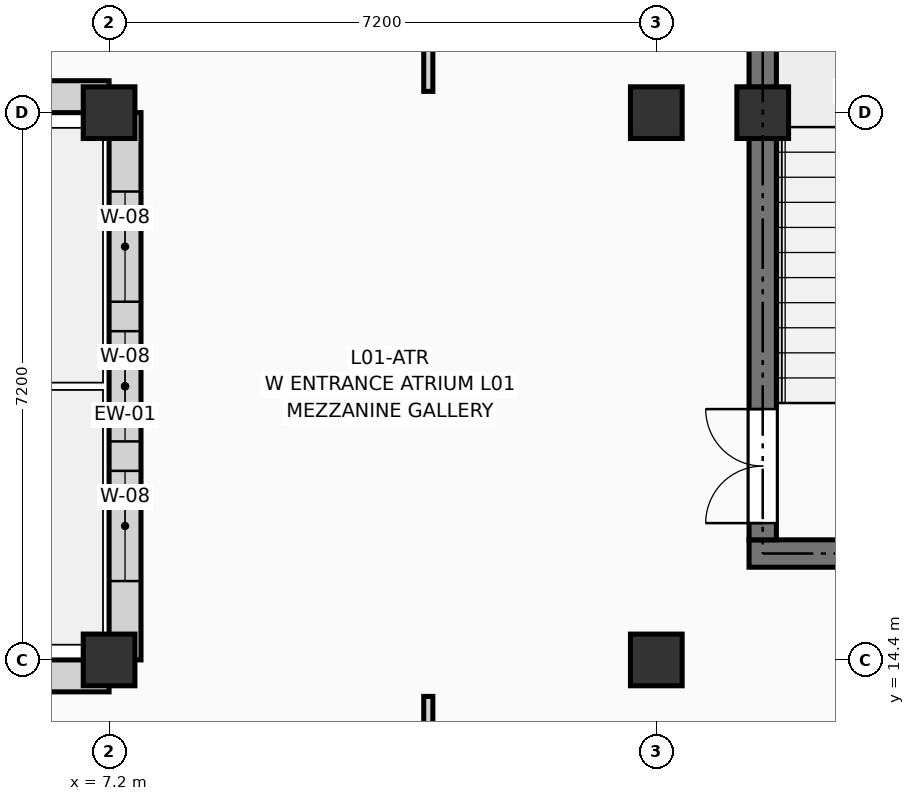
"""IFC4 building model, lengths in metres.
Left out: names, types, materials, properties, quantities, classifications, styles, units other than length and angle.
Written with IfcOpenShell. Run it as: python <this file> out.ifc"""

import sys

from ifc_helpers import new_model, si_unit, direction, frame, frame_2d, origin, origin_2d, place, context, subcontext, project, spatial, rectangle, extrude, element, fill, save


model = new_model("IFC4")
c1 = context("Model", 3, precision=1e-05, world=origin(), true_north=direction((0.0, 1.0)))
c2 = subcontext(c1, "Body", "Model", "MODEL_VIEW")
j1 = project(units=[si_unit("LENGTHUNIT", "METRE"), si_unit("PLANEANGLEUNIT", "RADIAN")], contexts=[c1])
p1 = place(None, origin())
s1 = spatial("IfcSite", under=j1, at=p1, CompositionType="ELEMENT")
p2 = place(p1, origin())
s2 = spatial("IfcBuilding", under=s1, at=p2, CompositionType="ELEMENT")
p3 = place(p2, frame((0.0, 0.0, 4.5)))
s3 = spatial("IfcBuildingStorey", under=s2, at=p3, CompositionType="ELEMENT", Elevation=4.5)
for number, where, z_axis, x_axis in (
    (1, (7.2, 14.4, 0.0), (0.0, 0.0, 1.0), (1.0, 0.0, 0.0)),
    (2, (7.2, 21.6, 0.0), (0.0, 0.0, 1.0), (1.0, 0.0, 0.0)),
    (3, (14.4, 14.4, 0.0), (0.0, 0.0, 1.0), (1.0, 0.0, 0.0)),
    (4, (14.4, 21.6, 0.0), (0.0, 0.0, 1.0), (1.0, 0.0, 0.0)),
    (5, (15.8, 21.6, 0.0), (0.0, 0.0, 1.0), (1.0, 0.0, 0.0)),
):
    element("IfcColumn", number, at=place(p3, frame(where, z_axis=z_axis, x_axis=x_axis)), inside=s3, PredefinedType="COLUMN", context=c2, shape_type="SweptSolid", body=[
        extrude(rectangle(XDim=0.68, YDim=0.68, at=origin_2d()), origin(), (0.0, 0.0, 1.0), 4.05),
    ])
p4 = place(p3, frame((7.41, 14.4, 0.0), z_axis=(0.0, 0.0, 1.0), x_axis=(0.0, 1.0, 0.0)))
e6 = element("IfcWall", 6, at=p4, inside=s3, PredefinedType="SOLIDWALL", context=c2, shape_type="SweptSolid", body=[
    extrude(rectangle(XDim=7.2, YDim=0.42, at=frame_2d((3.6, 0.0))), origin(), (0.0, 0.0, 1.0), 3.16),
])
p5 = place(p4, frame((1.038, 0.0, 0.18)))
e7 = element("IfcOpeningElement", 7, at=p5, cuts=e6, PredefinedType="OPENING", context=c2, shape_type="SweptSolid", body=[
    extrude(rectangle(XDim=1.45, YDim=2.8, at=frame_2d((0.725, 1.4))), frame((0.0, 0.222, 0.0), z_axis=(0.0, -1.0, 0.0), x_axis=(1.0, 0.0, 0.0)), (0.0, 0.0, 1.0), 0.444),
])
p6 = place(p4, frame((2.875, 0.0, 0.18)))
e8 = element("IfcOpeningElement", 8, at=p6, cuts=e6, PredefinedType="OPENING", context=c2, shape_type="SweptSolid", body=[
    extrude(rectangle(XDim=1.45, YDim=2.8, at=frame_2d((0.725, 1.4))), frame((0.0, 0.222, 0.0), z_axis=(0.0, -1.0, 0.0), x_axis=(1.0, 0.0, 0.0)), (0.0, 0.0, 1.0), 0.444),
])
p7 = place(p4, frame((4.712, 0.0, 0.18)))
e9 = element("IfcOpeningElement", 9, at=p7, cuts=e6, PredefinedType="OPENING", context=c2, shape_type="SweptSolid", body=[
    extrude(rectangle(XDim=1.45, YDim=2.8, at=frame_2d((0.725, 1.4))), frame((0.0, 0.222, 0.0), z_axis=(0.0, -1.0, 0.0), x_axis=(1.0, 0.0, 0.0)), (0.0, 0.0, 1.0), 0.444),
])
p8 = place(p3, frame((0.0, 21.81, 0.0), z_axis=(0.0, 0.0, 1.0), x_axis=(1.0, 0.0, 0.0)))
e10 = element("IfcWall", 10, at=p8, inside=s3, PredefinedType="SOLIDWALL", context=c2, shape_type="SweptSolid", body=[
    extrude(rectangle(XDim=7.2, YDim=0.42, at=frame_2d((3.6, 0.0))), origin(), (0.0, 0.0, 1.0), 3.16),
])
p9 = place(p8, frame((1.038, 0.0, 0.18)))
e11 = element("IfcOpeningElement", 11, at=p9, cuts=e10, PredefinedType="OPENING", context=c2, shape_type="SweptSolid", body=[
    extrude(rectangle(XDim=1.45, YDim=2.8, at=frame_2d((0.725, 1.4))), frame((0.0, 0.222, 0.0), z_axis=(0.0, -1.0, 0.0), x_axis=(1.0, 0.0, 0.0)), (0.0, 0.0, 1.0), 0.444),
])
p10 = place(p8, frame((2.875, 0.0, 0.18)))
e12 = element("IfcOpeningElement", 12, at=p10, cuts=e10, PredefinedType="OPENING", context=c2, shape_type="SweptSolid", body=[
    extrude(rectangle(XDim=1.45, YDim=2.8, at=frame_2d((0.725, 1.4))), frame((0.0, 0.222, 0.0), z_axis=(0.0, -1.0, 0.0), x_axis=(1.0, 0.0, 0.0)), (0.0, 0.0, 1.0), 0.444),
])
p11 = place(p8, frame((4.712, 0.0, 0.18)))
e13 = element("IfcOpeningElement", 13, at=p11, cuts=e10, PredefinedType="OPENING", context=c2, shape_type="SweptSolid", body=[
    extrude(rectangle(XDim=1.45, YDim=2.8, at=frame_2d((0.725, 1.4))), frame((0.0, 0.222, 0.0), z_axis=(0.0, -1.0, 0.0), x_axis=(1.0, 0.0, 0.0)), (0.0, 0.0, 1.0), 0.444),
])
p12 = place(p3, frame((0.0, 14.19, 0.0), z_axis=(0.0, 0.0, 1.0), x_axis=(1.0, 0.0, 0.0)))
e14 = element("IfcWall", 14, at=p12, inside=s3, PredefinedType="SOLIDWALL", context=c2, shape_type="SweptSolid", body=[
    extrude(rectangle(XDim=7.2, YDim=0.42, at=frame_2d((3.6, 0.0))), origin(), (0.0, 0.0, 1.0), 3.16),
])
p13 = place(p12, frame((1.038, 0.0, 0.18)))
e15 = element("IfcOpeningElement", 15, at=p13, cuts=e14, PredefinedType="OPENING", context=c2, shape_type="SweptSolid", body=[
    extrude(rectangle(XDim=1.45, YDim=2.8, at=frame_2d((0.725, 1.4))), frame((0.0, 0.222, 0.0), z_axis=(0.0, -1.0, 0.0), x_axis=(1.0, 0.0, 0.0)), (0.0, 0.0, 1.0), 0.444),
])
p14 = place(p12, frame((2.875, 0.0, 0.18)))
e16 = element("IfcOpeningElement", 16, at=p14, cuts=e14, PredefinedType="OPENING", context=c2, shape_type="SweptSolid", body=[
    extrude(rectangle(XDim=1.45, YDim=2.8, at=frame_2d((0.725, 1.4))), frame((0.0, 0.222, 0.0), z_axis=(0.0, -1.0, 0.0), x_axis=(1.0, 0.0, 0.0)), (0.0, 0.0, 1.0), 0.444),
])
p15 = place(p12, frame((4.712, 0.0, 0.18)))
e17 = element("IfcOpeningElement", 17, at=p15, cuts=e14, PredefinedType="OPENING", context=c2, shape_type="SweptSolid", body=[
    extrude(rectangle(XDim=1.45, YDim=2.8, at=frame_2d((0.725, 1.4))), frame((0.0, 0.222, 0.0), z_axis=(0.0, -1.0, 0.0), x_axis=(1.0, 0.0, 0.0)), (0.0, 0.0, 1.0), 0.444),
])
p16 = place(p3, frame((15.62, 15.8, 0.0), z_axis=(0.0, 0.0, 1.0), x_axis=(1.0, 0.0, 0.0)))
e18 = element("IfcWall", 18, at=p16, inside=s3, PredefinedType="SHEAR", context=c2, shape_type="SweptSolid", body=[
    extrude(rectangle(XDim=4.88, YDim=0.36, at=frame_2d((2.44, 0.0))), origin(), (0.0, 0.0, 1.0), 3.79),
])
p17 = place(p3, frame((15.8, 15.98, 0.0), z_axis=(0.0, 0.0, 1.0), x_axis=(0.0, 1.0, 0.0)))
e19 = element("IfcWall", 19, at=p17, inside=s3, PredefinedType="SHEAR", context=c2, shape_type="SweptSolid", body=[
    extrude(rectangle(XDim=7.64, YDim=0.36, at=frame_2d((3.82, 0.0))), origin(), (0.0, 0.0, 1.0), 3.79),
])
p18 = place(p17, frame((0.22, 0.0, 0.0)))
e20 = element("IfcOpeningElement", 20, at=p18, cuts=e19, PredefinedType="OPENING", context=c2, shape_type="SweptSolid", body=[
    extrude(rectangle(XDim=1.5, YDim=2.2, at=frame_2d((0.75, 1.1))), frame((0.0, 0.192, 0.0), z_axis=(0.0, -1.0, 0.0), x_axis=(1.0, 0.0, 0.0)), (0.0, 0.0, 1.0), 0.384),
])
p19 = place(p3, frame((11.4, 0.48, 0.0), z_axis=(0.0, 0.0, 1.0), x_axis=(0.0, 1.0, 0.0)))
e21 = element("IfcWall", 21, at=p19, inside=s3, PredefinedType="PARTITIONING", context=c2, shape_type="SweptSolid", body=[
    extrude(rectangle(XDim=13.44, YDim=0.12, at=frame_2d((6.72, 0.0))), origin(), (0.0, 0.0, 1.0), 3.775),
])
p20 = place(p19, frame((7.06, 0.0, 0.0)))
e22 = element("IfcOpeningElement", 22, at=p20, cuts=e21, PredefinedType="OPENING", context=c2, shape_type="SweptSolid", body=[
    extrude(rectangle(XDim=1.32, YDim=2.2, at=frame_2d((0.66, 1.1))), frame((0.0, 0.072, 0.0), z_axis=(0.0, -1.0, 0.0), x_axis=(1.0, 0.0, 0.0)), (0.0, 0.0, 1.0), 0.144),
])
p21 = place(p3, frame((11.4, 21.88, 0.0), z_axis=(0.0, 0.0, 1.0), x_axis=(0.0, 1.0, 0.0)))
e23 = element("IfcWall", 23, at=p21, inside=s3, PredefinedType="PARTITIONING", context=c2, shape_type="SweptSolid", body=[
    extrude(rectangle(XDim=16.44, YDim=0.12, at=frame_2d((8.22, 0.0))), origin(), (0.0, 0.0, 1.0), 3.775),
])
p22 = place(p21, frame((7.56, 0.0, 0.0)))
e24 = element("IfcOpeningElement", 24, at=p22, cuts=e23, PredefinedType="OPENING", context=c2, shape_type="SweptSolid", body=[
    extrude(rectangle(XDim=1.32, YDim=2.2, at=frame_2d((0.66, 1.1))), frame((0.0, 0.072, 0.0), z_axis=(0.0, -1.0, 0.0), x_axis=(1.0, 0.0, 0.0)), (0.0, 0.0, 1.0), 0.144),
])
p23 = place(p5, origin())
e25 = element("IfcWindow", 25, at=p23, inside=s3, PartitioningType="SINGLE_PANEL", PredefinedType="WINDOW", context=c2, shape_type="SweptSolid", body=[
    extrude(rectangle(XDim=1.45, YDim=2.8, at=frame_2d((0.725, 1.4))), frame((0.0, 0.03, 0.0), z_axis=(0.0, -1.0, 0.0), x_axis=(1.0, 0.0, 0.0)), (0.0, 0.0, 1.0), 0.06),
])
fill(e7, e25)
p24 = place(p6, origin())
e26 = element("IfcWindow", 26, at=p24, inside=s3, PartitioningType="SINGLE_PANEL", PredefinedType="WINDOW", context=c2, shape_type="SweptSolid", body=[
    extrude(rectangle(XDim=1.45, YDim=2.8, at=frame_2d((0.725, 1.4))), frame((0.0, 0.03, 0.0), z_axis=(0.0, -1.0, 0.0), x_axis=(1.0, 0.0, 0.0)), (0.0, 0.0, 1.0), 0.06),
])
fill(e8, e26)
p25 = place(p7, origin())
e27 = element("IfcWindow", 27, at=p25, inside=s3, PartitioningType="SINGLE_PANEL", PredefinedType="WINDOW", context=c2, shape_type="SweptSolid", body=[
    extrude(rectangle(XDim=1.45, YDim=2.8, at=frame_2d((0.725, 1.4))), frame((0.0, 0.03, 0.0), z_axis=(0.0, -1.0, 0.0), x_axis=(1.0, 0.0, 0.0)), (0.0, 0.0, 1.0), 0.06),
])
fill(e9, e27)
p26 = place(p18, origin())
e28 = element("IfcDoor", 28, at=p26, inside=s3, OperationType="DOUBLE_DOOR_SINGLE_SWING", PredefinedType="DOOR", context=c2, shape_type="SweptSolid", body=[
    extrude(rectangle(XDim=1.5, YDim=2.2, at=frame_2d((0.75, 1.1))), frame((0.0, 0.025, 0.0), z_axis=(0.0, -1.0, 0.0), x_axis=(1.0, 0.0, 0.0)), (0.0, 0.0, 1.0), 0.05),
])
fill(e20, e28)
save(model, sys.argv[1])
